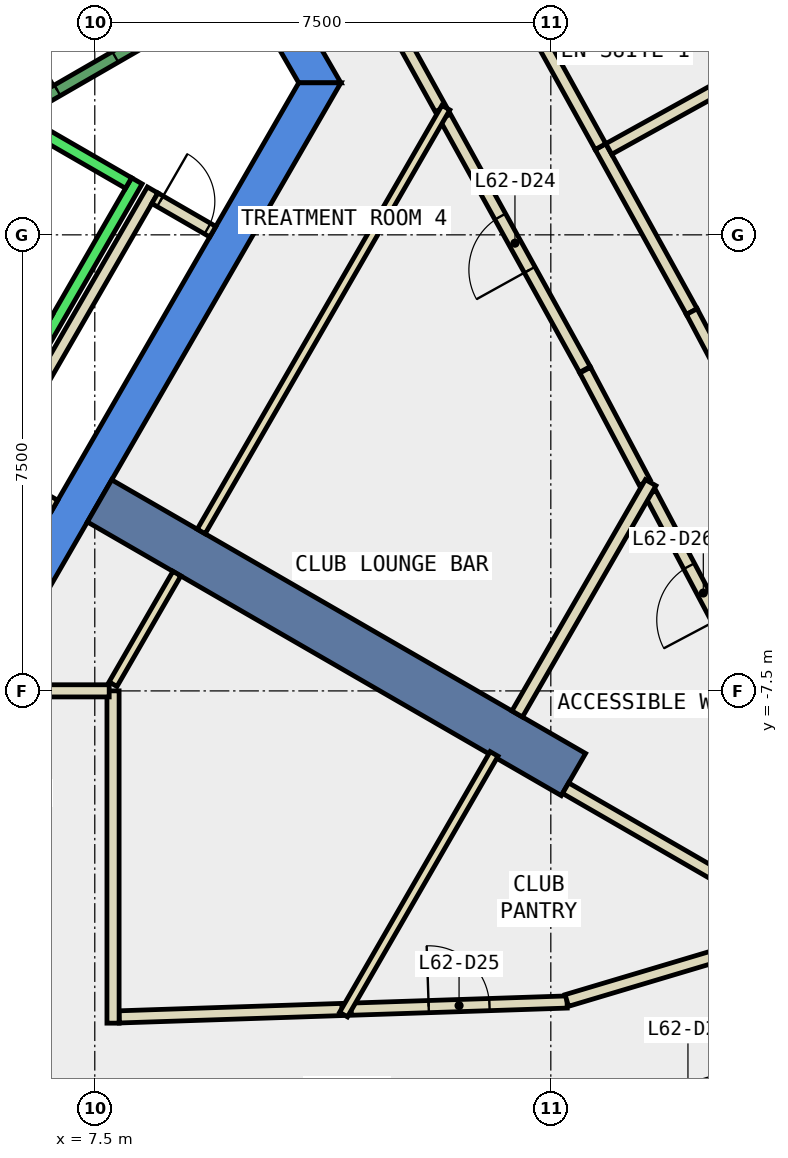
"""IFC4 building model, lengths in metres.
Left out: names, types, materials, properties, quantities, classifications, styles, units other than length and angle.
Written with IfcOpenShell. Run it as: python <this file> out.ifc"""

import sys

from ifc_helpers import new_model, si_unit, direction, frame, frame_2d, origin, place, context, subcontext, project, spatial, polyline, rectangle, outline, extrude, element, fill, save


model = new_model("IFC4")
c1 = context("Model", 3, precision=1e-05, world=origin(), true_north=direction((0.0, 1.0)))
c2 = subcontext(c1, "Body", "Model", "MODEL_VIEW")
j1 = project(units=[si_unit("LENGTHUNIT", "METRE"), si_unit("PLANEANGLEUNIT", "RADIAN")], contexts=[c1])
p1 = place(None, origin())
s1 = spatial("IfcSite", under=j1, at=p1, CompositionType="ELEMENT")
p2 = place(p1, origin())
s2 = spatial("IfcBuilding", under=s1, at=p2, CompositionType="ELEMENT")
p3 = place(p2, frame((0.0, 0.0, 270.2)))
s3 = spatial("IfcBuildingStorey", under=s2, at=p3, CompositionType="ELEMENT", Elevation=270.2)
p4 = place(p3, frame((0.0, 0.0, -0.34)))
e1 = element("IfcWall", 1, at=p4, inside=s3, PredefinedType="SHEAR", context=c2, shape_type="SweptSolid", body=[
    extrude(outline(polyline([(6.786, 10.747), (6.266, 10.447), (10.854, 2.5), (11.547, 2.5), (6.786, 10.747)])), origin(), (0.0, 0.0, 1.0), 3.6),
])
p5 = place(p3, frame((0.0, 0.0, -0.34)))
e2 = element("IfcWall", 2, at=p5, inside=s3, PredefinedType="SHEAR", context=c2, shape_type="SweptSolid", body=[
    extrude(outline(polyline([(5.774, -7.5), (11.547, 2.5), (10.854, 2.5), (5.427, -6.9), (5.774, -7.5)])), origin(), (0.0, 0.0, 1.0), 3.6),
])
p6 = place(p3, frame((7.578, -4.375, -0.34), z_axis=(0.0, 0.0, 1.0), x_axis=(0.866024315419, -0.5000018851, 0.0)))
e3 = element("IfcWall", 3, at=p6, inside=s3, PredefinedType="SHEAR", context=c2, shape_type="SweptSolid", body=[
    extrude(rectangle(XDim=9.0, YDim=0.8, at=frame_2d((4.5, 0.0))), origin(), (0.0, 0.0, 1.0), 3.6),
])
p7 = place(p3, frame((13.188, 2.071, 0.0), z_axis=(0.0, 0.0, 1.0), x_axis=(-0.484398936474, 0.874847226859, 0.0)))
e4 = element("IfcWall", 4, at=p7, inside=s3, PredefinedType="PARTITIONING", context=c2, shape_type="SweptSolid", body=[
    extrude(rectangle(XDim=1.567, YDim=0.2, at=frame_2d((0.783, 0.0))), origin(), (0.0, 0.0, 1.0), 3.26),
])
p8 = place(p3, frame((7.9, -12.861, 0.0), z_axis=(0.0, 0.0, 1.0), x_axis=(0.999446088303, 0.033279371614, 0.0)))
e5 = element("IfcWall", 5, at=p8, inside=s3, PredefinedType="PARTITIONING", context=c2, shape_type="SweptSolid", body=[
    extrude(rectangle(XDim=3.668, YDim=0.2, at=frame_2d((1.834, 0.0))), origin(), (0.0, 0.0, 1.0), 3.26),
])
p9 = place(p3, frame((16.545, -4.074, 0.0), z_axis=(0.0, 0.0, 1.0), x_axis=(-0.468321873419, 0.883557934081, 0.0)))
e6 = element("IfcWall", 6, at=p9, inside=s3, PredefinedType="PARTITIONING", context=c2, shape_type="SweptSolid", body=[
    extrude(rectangle(XDim=2.093, YDim=0.2, at=frame_2d((1.046, 0.0))), origin(), (0.0, 0.0, 1.0), 3.26),
])
p10 = place(p3, frame((15.56, -2.214, 0.0), z_axis=(0.0, 0.0, 1.0), x_axis=(-0.484323615817, 0.874888927329, 0.0)))
e7 = element("IfcWall", 7, at=p10, inside=s3, PredefinedType="PARTITIONING", context=c2, shape_type="SweptSolid", body=[
    extrude(rectangle(XDim=4.747, YDim=0.2, at=frame_2d((2.374, 0.0))), origin(), (0.0, 0.0, 1.0), 3.26),
])
p11 = place(p10, frame((1.874, 0.0, 0.0)))
e8 = element("IfcOpeningElement", 8, at=p11, cuts=e7, PredefinedType="OPENING", context=c2, shape_type="SweptSolid", body=[
    extrude(rectangle(XDim=1.0, YDim=2.1, at=frame_2d((0.5, 1.05))), frame((0.0, 0.11, 0.0), z_axis=(0.0, -1.0, 0.0), x_axis=(1.0, 0.0, 0.0)), (0.0, 0.0, 1.0), 0.22),
])
p12 = place(p3, frame((11.716, -12.734, 0.0), z_axis=(0.0, 0.0, 1.0), x_axis=(0.999449093602, 0.03318899362, 0.0)))
e9 = element("IfcWall", 9, at=p12, inside=s3, PredefinedType="PARTITIONING", context=c2, shape_type="SweptSolid", body=[
    extrude(rectangle(XDim=3.553, YDim=0.2, at=frame_2d((1.776, 0.0))), origin(), (0.0, 0.0, 1.0), 3.26),
])
p13 = place(p12, frame((1.276, 0.0, 0.0)))
e10 = element("IfcOpeningElement", 10, at=p13, cuts=e9, PredefinedType="OPENING", context=c2, shape_type="SweptSolid", body=[
    extrude(rectangle(XDim=1.0, YDim=2.1, at=frame_2d((0.5, 1.05))), frame((0.0, 0.11, 0.0), z_axis=(0.0, -1.0, 0.0), x_axis=(1.0, 0.0, 0.0)), (0.0, 0.0, 1.0), 0.22),
])
p14 = place(p3, frame((15.263, -12.591, 0.0), z_axis=(0.0, 0.0, 1.0), x_axis=(0.958253964342, 0.285918414628, 0.0)))
e11 = element("IfcWall", 11, at=p14, inside=s3, PredefinedType="PARTITIONING", context=c2, shape_type="SweptSolid", body=[
    extrude(rectangle(XDim=2.743, YDim=0.2, at=frame_2d((1.371, 0.0))), origin(), (0.0, 0.0, 1.0), 3.26),
])
p15 = place(p3, frame((18.377, -7.53, 0.0), z_axis=(0.0, 0.0, 1.0), x_axis=(-0.468214048123, 0.883615077474, 0.0)))
e12 = element("IfcWall", 12, at=p15, inside=s3, PredefinedType="PARTITIONING", context=c2, shape_type="SweptSolid", body=[
    extrude(rectangle(XDim=3.712, YDim=0.2, at=frame_2d((1.856, 0.0))), origin(), (0.0, 0.0, 1.0), 3.26),
])
p16 = place(p15, frame((1.356, 0.0, 0.0)))
e13 = element("IfcOpeningElement", 13, at=p16, cuts=e12, PredefinedType="OPENING", context=c2, shape_type="SweptSolid", body=[
    extrude(rectangle(XDim=1.0, YDim=2.1, at=frame_2d((0.5, 1.05))), frame((0.0, 0.11, 0.0), z_axis=(0.0, -1.0, 0.0), x_axis=(1.0, 0.0, 0.0)), (0.0, 0.0, 1.0), 0.22),
])
p17 = place(p3, frame((18.924, -13.587, 0.0), z_axis=(0.0, 0.0, 1.0), x_axis=(-0.958378336681, -0.285501250052, 0.0)))
e14 = element("IfcWall", 14, at=p17, inside=s3, PredefinedType="PARTITIONING", context=c2, shape_type="SweptSolid", body=[
    extrude(rectangle(XDim=3.482, YDim=0.2, at=frame_2d((1.741, 0.0))), origin(), (0.0, 0.0, 1.0), 3.26),
])
p18 = place(p17, frame((0.841, 0.0, 0.0)))
e15 = element("IfcOpeningElement", 15, at=p18, cuts=e14, PredefinedType="OPENING", context=c2, shape_type="SweptSolid", body=[
    extrude(rectangle(XDim=1.8, YDim=2.1, at=frame_2d((0.9, 1.05))), frame((0.0, 0.11, 0.0), z_axis=(0.0, -1.0, 0.0), x_axis=(1.0, 0.0, 0.0)), (0.0, 0.0, 1.0), 0.22),
])
p19 = place(p3, frame((15.817, 1.451, 0.0), z_axis=(0.0, 0.0, 1.0), x_axis=(0.48417811398, -0.874969458863, 0.0)))
e16 = element("IfcWall", 16, at=p19, inside=s3, PredefinedType="PARTITIONING", context=c2, shape_type="SweptSolid", body=[
    extrude(rectangle(XDim=3.101, YDim=0.2, at=frame_2d((1.55, 0.0))), origin(), (0.0, 0.0, 1.0), 3.26),
])
p20 = place(p3, frame((17.318, -1.262, 0.0), z_axis=(0.0, 0.0, 1.0), x_axis=(0.468313568794, -0.883562335822, 0.0)))
e17 = element("IfcWall", 17, at=p20, inside=s3, PredefinedType="PARTITIONING", context=c2, shape_type="SweptSolid", body=[
    extrude(rectangle(XDim=6.216, YDim=0.2, at=frame_2d((3.108, 0.0))), origin(), (0.0, 0.0, 1.0), 3.26),
])
p21 = place(p20, frame((2.608, 0.0, 0.0)))
e18 = element("IfcOpeningElement", 18, at=p21, cuts=e17, PredefinedType="OPENING", context=c2, shape_type="SweptSolid", body=[
    extrude(rectangle(XDim=1.0, YDim=2.1, at=frame_2d((0.5, 1.05))), frame((0.0, 0.11, 0.0), z_axis=(0.0, -1.0, 0.0), x_axis=(1.0, 0.0, 0.0)), (0.0, 0.0, 1.0), 0.22),
])
p22 = place(p3, frame((14.267, 4.25, 0.0), z_axis=(0.0, 0.0, 1.0), x_axis=(0.4843920198, -0.874851056554, 0.0)))
e19 = element("IfcWall", 19, at=p22, inside=s3, PredefinedType="PARTITIONING", context=c2, shape_type="SweptSolid", body=[
    extrude(rectangle(XDim=3.199, YDim=0.2, at=frame_2d((1.6, 0.0))), origin(), (0.0, 0.0, 1.0), 3.26),
])
p23 = place(p3, frame((5.751, -3.938, 0.0), z_axis=(0.0, 0.0, 1.0), x_axis=(0.500034260056, 0.866005622828, 0.0)))
e20 = element("IfcWall", 20, at=p23, inside=s3, PredefinedType="PARTITIONING", context=c2, shape_type="SweptSolid", body=[
    extrude(rectangle(XDim=5.399, YDim=0.2, at=frame_2d((2.7, 0.0))), origin(), (0.0, 0.0, 1.0), 3.26),
])
p24 = place(p3, frame((8.488, 0.602, 0.0), z_axis=(0.0, 0.0, 1.0), x_axis=(0.866063652425, -0.499933745558, 0.0)))
e21 = element("IfcWall", 21, at=p24, inside=s3, PredefinedType="PARTITIONING", context=c2, shape_type="SweptSolid", body=[
    extrude(rectangle(XDim=1.1, YDim=0.2, at=frame_2d((0.55, 0.0))), origin(), (0.0, 0.0, 1.0), 3.26),
])
p25 = place(p24, frame((0.1, 0.0, 0.0)))
e22 = element("IfcOpeningElement", 22, at=p25, cuts=e21, PredefinedType="OPENING", context=c2, shape_type="SweptSolid", body=[
    extrude(rectangle(XDim=0.9, YDim=2.1, at=frame_2d((0.45, 1.05))), frame((0.0, 0.11, 0.0), z_axis=(0.0, -1.0, 0.0), x_axis=(1.0, 0.0, 0.0)), (0.0, 0.0, 1.0), 0.22),
])
p26 = place(p3, frame((6.841, -4.452, 0.0), z_axis=(0.0, 0.0, 1.0), x_axis=(-0.86621513555, 0.499671230855, 0.0)))
e23 = element("IfcWall", 23, at=p26, inside=s3, PredefinedType="PARTITIONING", context=c2, shape_type="SweptSolid", body=[
    extrude(rectangle(XDim=1.1, YDim=0.2, at=frame_2d((0.55, 0.0))), origin(), (0.0, 0.0, 1.0), 3.26),
])
p27 = place(p3, frame((7.8, -7.39, 0.0), z_axis=(0.0, 0.0, 1.0), x_axis=(0.499977374825, 0.866038466041, 0.0)))
e24 = element("IfcWall", 24, at=p27, inside=s3, PredefinedType="PARTITIONING", context=c2, shape_type="SweptSolid", body=[
    extrude(rectangle(XDim=2.1, YDim=0.15, at=frame_2d((1.05, 0.0))), origin(), (0.0, 0.0, 1.0), 3.26),
])
p28 = place(p3, frame((7.8, -7.499, 0.0), z_axis=(0.0, 0.0, 1.0), x_axis=(0.0, -1.0, 0.0)))
e25 = element("IfcWall", 25, at=p28, inside=s3, PredefinedType="PARTITIONING", context=c2, shape_type="SweptSolid", body=[
    extrude(rectangle(XDim=5.465, YDim=0.2, at=frame_2d((2.732, 0.0))), origin(), (0.0, 0.0, 1.0), 3.26),
])
p29 = place(p3, frame((14.067, -8.536, 0.0), z_axis=(0.0, 0.0, 1.0), x_axis=(-0.500100941679, -0.865967117235, 0.0)))
e26 = element("IfcWall", 26, at=p29, inside=s3, PredefinedType="PARTITIONING", context=c2, shape_type="SweptSolid", body=[
    extrude(rectangle(XDim=4.951, YDim=0.15, at=frame_2d((2.475, 0.0))), origin(), (0.0, 0.0, 1.0), 3.26),
])
p30 = place(p3, frame((16.642, -4.075, 0.0), z_axis=(0.0, 0.0, 1.0), x_axis=(-0.49980426207, -0.866138383641, 0.0)))
e27 = element("IfcWall", 27, at=p30, inside=s3, PredefinedType="PARTITIONING", context=c2, shape_type="SweptSolid", body=[
    extrude(rectangle(XDim=4.392, YDim=0.2, at=frame_2d((2.196, 0.0))), origin(), (0.0, 0.0, 1.0), 3.26),
])
p31 = place(p3, frame((15.243, -9.099, 0.0), z_axis=(0.0, 0.0, 1.0), x_axis=(0.866026010844, -0.49999894854, 0.0)))
e28 = element("IfcWall", 28, at=p31, inside=s3, PredefinedType="PARTITIONING", context=c2, shape_type="SweptSolid", body=[
    extrude(rectangle(XDim=4.0, YDim=0.2, at=frame_2d((2.0, 0.0))), origin(), (0.0, 0.0, 1.0), 3.26),
])
p32 = place(p3, frame((15.953, 1.412, 0.0), z_axis=(0.0, 0.0, 1.0), x_axis=(0.875014790305, 0.484096185429, 0.0)))
e29 = element("IfcWall", 29, at=p32, inside=s3, PredefinedType="PARTITIONING", context=c2, shape_type="SweptSolid", body=[
    extrude(rectangle(XDim=2.4, YDim=0.2, at=frame_2d((1.2, 0.0))), origin(), (0.0, 0.0, 1.0), 3.26),
])
p33 = place(p3, frame((18.189, 2.535, 0.0), z_axis=(0.0, 0.0, 1.0), x_axis=(-0.484447408253, 0.874820386501, 0.0)))
e30 = element("IfcWall", 30, at=p33, inside=s3, PredefinedType="PARTITIONING", context=c2, shape_type="SweptSolid", body=[
    extrude(rectangle(XDim=3.4, YDim=0.2, at=frame_2d((1.7, 0.0))), origin(), (0.0, 0.0, 1.0), 3.26),
])
p34 = place(p33, frame((1.25, 0.0, 0.0)))
e31 = element("IfcOpeningElement", 31, at=p34, cuts=e30, PredefinedType="OPENING", context=c2, shape_type="SweptSolid", body=[
    extrude(rectangle(XDim=0.9, YDim=2.1, at=frame_2d((0.45, 1.05))), frame((0.0, 0.11, 0.0), z_axis=(0.0, -1.0, 0.0), x_axis=(1.0, 0.0, 0.0)), (0.0, 0.0, 1.0), 0.22),
])
p35 = place(p3, frame((9.25, -4.878, 0.0), z_axis=(0.0, 0.0, 1.0), x_axis=(0.499982416899, 0.866035555154, 0.0)))
e32 = element("IfcWall", 32, at=p35, inside=s3, PredefinedType="PARTITIONING", context=c2, shape_type="SweptSolid", body=[
    extrude(rectangle(XDim=8.048, YDim=0.15, at=frame_2d((4.024, 0.0))), origin(), (0.0, 0.0, 1.0), 3.26),
])
p36 = place(p3, frame((5.944, -7.499, 0.0), z_axis=(0.0, 0.0, 1.0), x_axis=(1.0, 0.0, 0.0)))
e33 = element("IfcWall", 33, at=p36, inside=s3, PredefinedType="PARTITIONING", context=c2, shape_type="SweptSolid", body=[
    extrude(rectangle(XDim=1.793, YDim=0.2, at=frame_2d((0.896, 0.0))), origin(), (0.0, 0.0, 1.0), 3.26),
])
p37 = place(p3, frame((5.492, -3.788, 0.0), z_axis=(0.0, 0.0, 1.0), x_axis=(0.500034260056, 0.866005622828, 0.0)))
e34 = element("IfcWall", 34, at=p37, inside=s3, PredefinedType="STANDARD", context=c2, shape_type="SweptSolid", body=[
    extrude(rectangle(XDim=5.399, YDim=0.2, at=frame_2d((2.7, 0.0))), origin(), (0.0, 0.0, 1.0), 3.26),
])
for number, where, z_axis, x_axis in (
    (35, (4.677, -0.2, 0.0), (0.0, 0.0, 1.0), (0.866, -0.5, 0.0)),
    (36, (5.977, 2.052, 0.0), (0.0, 0.0, 1.0), (0.866, -0.5, 0.0)),
):
    element("IfcWall", number, at=place(p3, frame(where, z_axis=z_axis, x_axis=x_axis)), inside=s3, PredefinedType="STANDARD", context=c2, shape_type="SweptSolid", body=[
        extrude(rectangle(XDim=2.399, YDim=0.2, at=frame_2d((1.2, 0.0))), origin(), (0.0, 0.0, 1.0), 3.26),
    ])
p38 = place(p3, frame((4.806, 1.176, 0.0), z_axis=(0.0, 0.0, 1.0), x_axis=(0.866059941101, 0.499940174841, 0.0)))
e37 = element("IfcWall", 37, at=p38, inside=s3, PredefinedType="STANDARD", context=c2, shape_type="SweptSolid", body=[
    extrude(rectangle(XDim=4.4, YDim=0.2, at=frame_2d((2.2, 0.0))), origin(), (0.0, 0.0, 1.0), 3.26),
])
p39 = place(p38, frame((2.4, 0.0, 0.0)))
e38 = element("IfcOpeningElement", 38, at=p39, cuts=e37, PredefinedType="OPENING", context=c2, shape_type="SweptSolid", body=[
    extrude(rectangle(XDim=1.1, YDim=2.2, at=frame_2d((0.55, 1.1))), frame((0.0, 0.11, 0.0), z_axis=(0.0, -1.0, 0.0), x_axis=(1.0, 0.0, 0.0)), (0.0, 0.0, 1.0), 0.22),
])
p40 = place(p18, origin())
e39 = element("IfcDoor", 39, at=p40, inside=s3, OperationType="DOUBLE_DOOR_SINGLE_SWING", PredefinedType="DOOR", context=c2, shape_type="SweptSolid", body=[
    extrude(rectangle(XDim=1.8, YDim=2.1, at=frame_2d((0.9, 1.05))), frame((0.0, 0.025, 0.0), z_axis=(0.0, -1.0, 0.0), x_axis=(1.0, 0.0, 0.0)), (0.0, 0.0, 1.0), 0.05),
])
fill(e15, e39)
p41 = place(p11, origin())
e40 = element("IfcDoor", 40, at=p41, inside=s3, OperationType="SINGLE_SWING_LEFT", PredefinedType="DOOR", context=c2, shape_type="SweptSolid", body=[
    extrude(rectangle(XDim=1.0, YDim=2.1, at=frame_2d((0.5, 1.05))), frame((0.0, 0.025, 0.0), z_axis=(0.0, -1.0, 0.0), x_axis=(1.0, 0.0, 0.0)), (0.0, 0.0, 1.0), 0.05),
])
fill(e8, e40)
p42 = place(p13, origin())
e41 = element("IfcDoor", 41, at=p42, inside=s3, OperationType="SINGLE_SWING_LEFT", PredefinedType="DOOR", context=c2, shape_type="SweptSolid", body=[
    extrude(rectangle(XDim=1.0, YDim=2.1, at=frame_2d((0.5, 1.05))), frame((0.0, 0.025, 0.0), z_axis=(0.0, -1.0, 0.0), x_axis=(1.0, 0.0, 0.0)), (0.0, 0.0, 1.0), 0.05),
])
fill(e10, e41)
p43 = place(p16, origin())
e42 = element("IfcDoor", 42, at=p43, inside=s3, OperationType="SINGLE_SWING_RIGHT", PredefinedType="DOOR", context=c2, shape_type="SweptSolid", body=[
    extrude(rectangle(XDim=1.0, YDim=2.1, at=frame_2d((0.5, 1.05))), frame((0.0, 0.025, 0.0), z_axis=(0.0, -1.0, 0.0), x_axis=(1.0, 0.0, 0.0)), (0.0, 0.0, 1.0), 0.05),
])
fill(e13, e42)
p44 = place(p25, origin())
e43 = element("IfcDoor", 43, at=p44, inside=s3, OperationType="SINGLE_SWING_RIGHT", PredefinedType="DOOR", context=c2, shape_type="SweptSolid", body=[
    extrude(rectangle(XDim=0.9, YDim=2.1, at=frame_2d((0.45, 1.05))), frame((0.0, 0.025, 0.0), z_axis=(0.0, -1.0, 0.0), x_axis=(1.0, 0.0, 0.0)), (0.0, 0.0, 1.0), 0.05),
])
fill(e22, e43)
p45 = place(p39, origin())
e44 = element("IfcDoor", 44, at=p45, inside=s3, OperationType="SINGLE_SWING_LEFT", PredefinedType="DOOR", context=c2, shape_type="SweptSolid", body=[
    extrude(rectangle(XDim=1.1, YDim=2.2, at=frame_2d((0.55, 1.1))), frame((0.0, 0.025, 0.0), z_axis=(0.0, -1.0, 0.0), x_axis=(1.0, 0.0, 0.0)), (0.0, 0.0, 1.0), 0.05),
])
fill(e38, e44)
save(model, sys.argv[1])
